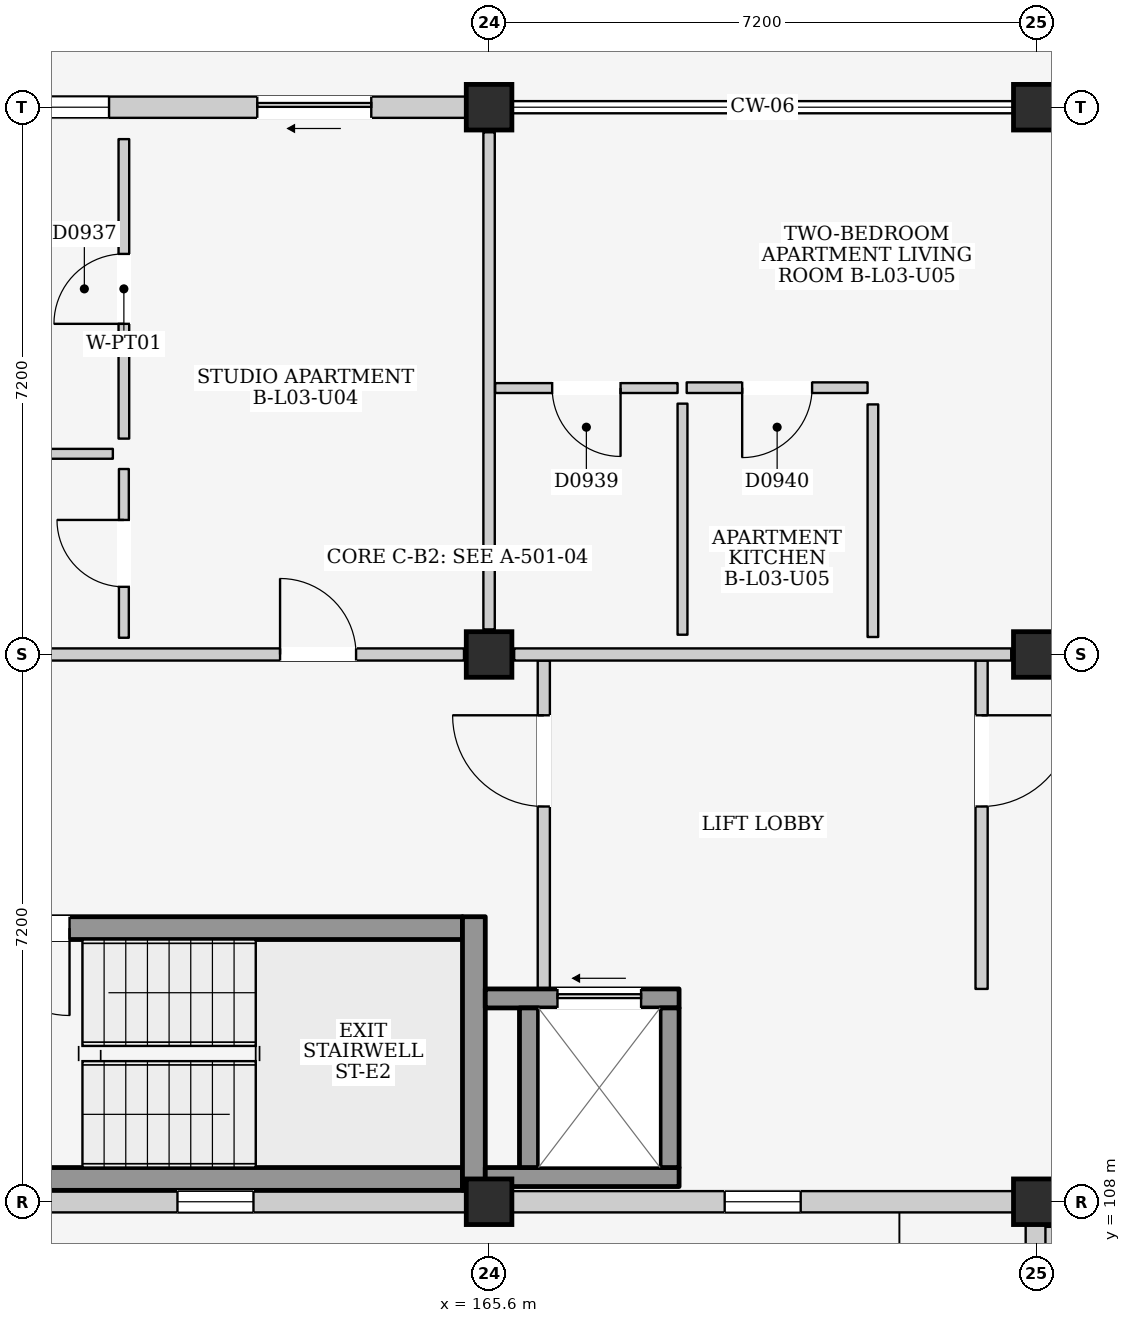
"""IFC4 building model, lengths in metres.
Left out: names, types, materials, properties, quantities, classifications, styles, units other than length and angle.
Written with IfcOpenShell. Run it as: python <this file> out.ifc"""

import sys

from ifc_helpers import new_model, si_unit, direction, frame, frame_2d, origin, origin_2d, place, context, subcontext, project, spatial, rectangle, extrude, element, fill, save


model = new_model("IFC4")
c1 = context("Model", 3, precision=1e-05, world=origin(), true_north=direction((0.0, 1.0)))
c2 = subcontext(c1, "Body", "Model", "MODEL_VIEW")
j1 = project(units=[si_unit("LENGTHUNIT", "METRE"), si_unit("PLANEANGLEUNIT", "RADIAN")], contexts=[c1])
p1 = place(None, origin())
s1 = spatial("IfcSite", under=j1, at=p1, CompositionType="ELEMENT")
p2 = place(p1, origin())
s2 = spatial("IfcBuilding", under=s1, at=p2, CompositionType="ELEMENT")
p3 = place(p2, frame((0.0, 0.0, 12.2)))
s3 = spatial("IfcBuildingStorey", under=s2, at=p3, CompositionType="ELEMENT", Elevation=12.2)
for number, where, z_axis, x_axis in (
    (1, (165.6, 108.0, 0.0), (0.0, 0.0, 1.0), (1.0, 0.0, 0.0)),
    (2, (165.6, 115.2, 0.0), (0.0, 0.0, 1.0), (1.0, 0.0, 0.0)),
    (3, (165.6, 122.4, 0.0), (0.0, 0.0, 1.0), (1.0, 0.0, 0.0)),
    (4, (172.8, 108.0, 0.0), (0.0, 0.0, 1.0), (1.0, 0.0, 0.0)),
    (5, (172.8, 115.2, 0.0), (0.0, 0.0, 1.0), (1.0, 0.0, 0.0)),
    (6, (172.8, 122.4, 0.0), (0.0, 0.0, 1.0), (1.0, 0.0, 0.0)),
):
    element("IfcColumn", number, at=place(p3, frame(where, z_axis=z_axis, x_axis=x_axis)), inside=s3, PredefinedType="COLUMN", context=c2, shape_type="SweptSolid", body=[
        extrude(rectangle(XDim=0.6, YDim=0.6, at=origin_2d()), origin(), (0.0, 0.0, 1.0), 3.2),
    ])
p4 = place(p3, frame((158.7, 108.0, 0.0), z_axis=(0.0, 0.0, 1.0), x_axis=(1.0, 0.0, 0.0)))
e7 = element("IfcWall", 7, at=p4, inside=s3, PredefinedType="ELEMENTEDWALL", context=c2, shape_type="SweptSolid", body=[
    extrude(rectangle(XDim=6.6, YDim=0.28, at=frame_2d((3.3, 0.0))), origin(), (0.0, 0.0, 1.0), 2.365),
])
p5 = place(p4, frame((2.8, 0.0, 1.2)))
e8 = element("IfcOpeningElement", 8, at=p5, cuts=e7, PredefinedType="OPENING", context=c2, shape_type="SweptSolid", body=[
    extrude(rectangle(XDim=1.0, YDim=0.9, at=frame_2d((0.5, 0.45))), frame((0.0, 0.155, 0.0), z_axis=(0.0, -1.0, 0.0), x_axis=(1.0, 0.0, 0.0)), (0.0, 0.0, 1.0), 0.31),
])
p6 = place(p3, frame((158.7, 122.4, 0.0), z_axis=(0.0, 0.0, 1.0), x_axis=(1.0, 0.0, 0.0)))
e9 = element("IfcWall", 9, at=p6, inside=s3, PredefinedType="ELEMENTEDWALL", context=c2, shape_type="SweptSolid", body=[
    extrude(rectangle(XDim=6.6, YDim=0.28, at=frame_2d((3.3, 0.0))), origin(), (0.0, 0.0, 1.0), 2.445),
])
p7 = place(p6, frame((3.85, 0.0, 0.0)))
e10 = element("IfcOpeningElement", 10, at=p7, cuts=e9, PredefinedType="OPENING", context=c2, shape_type="SweptSolid", body=[
    extrude(rectangle(XDim=1.5, YDim=2.12, at=frame_2d((0.75, 1.06))), frame((0.0, 0.155, 0.0), z_axis=(0.0, -1.0, 0.0), x_axis=(1.0, 0.0, 0.0)), (0.0, 0.0, 1.0), 0.31),
])
p8 = place(p6, frame((0.55, 0.0, 0.835)))
e11 = element("IfcOpeningElement", 11, at=p8, cuts=e9, PredefinedType="OPENING", context=c2, shape_type="SweptSolid", body=[
    extrude(rectangle(XDim=1.35, YDim=1.5, at=frame_2d((0.675, 0.75))), frame((0.0, 0.155, 0.0), z_axis=(0.0, -1.0, 0.0), x_axis=(1.0, 0.0, 0.0)), (0.0, 0.0, 1.0), 0.31),
])
p9 = place(p3, frame((165.9, 108.0, 0.0), z_axis=(0.0, 0.0, 1.0), x_axis=(1.0, 0.0, 0.0)))
e12 = element("IfcWall", 12, at=p9, inside=s3, PredefinedType="ELEMENTEDWALL", context=c2, shape_type="SweptSolid", body=[
    extrude(rectangle(XDim=6.6, YDim=0.28, at=frame_2d((3.3, 0.0))), origin(), (0.0, 0.0, 1.0), 2.365),
])
p10 = place(p9, frame((2.8, 0.0, 1.2)))
e13 = element("IfcOpeningElement", 13, at=p10, cuts=e12, PredefinedType="OPENING", context=c2, shape_type="SweptSolid", body=[
    extrude(rectangle(XDim=1.0, YDim=0.9, at=frame_2d((0.5, 0.45))), frame((0.0, 0.155, 0.0), z_axis=(0.0, -1.0, 0.0), x_axis=(1.0, 0.0, 0.0)), (0.0, 0.0, 1.0), 0.31),
])
p11 = place(p3, frame((172.8, 101.1, 0.0), z_axis=(0.0, 0.0, 1.0), x_axis=(0.0, 1.0, 0.0)))
e14 = element("IfcWall", 14, at=p11, inside=s3, PredefinedType="ELEMENTEDWALL", context=c2, shape_type="SweptSolid", body=[
    extrude(rectangle(XDim=6.6, YDim=0.28, at=frame_2d((3.3, 0.0))), origin(), (0.0, 0.0, 1.0), 2.415),
])
p12 = place(p11, frame((2.5, 0.0, 0.0)))
e15 = element("IfcOpeningElement", 15, at=p12, cuts=e14, PredefinedType="OPENING", context=c2, shape_type="SweptSolid", body=[
    extrude(rectangle(XDim=1.4, YDim=2.1, at=frame_2d((0.7, 1.05))), frame((0.0, 0.155, 0.0), z_axis=(0.0, -1.0, 0.0), x_axis=(1.0, 0.0, 0.0)), (0.0, 0.0, 1.0), 0.31),
])
p13 = place(p3, frame((158.75, 108.3, 0.0), z_axis=(0.0, 0.0, 1.0), x_axis=(1.0, 0.0, 0.0)))
e16 = element("IfcWall", 16, at=p13, inside=s3, PredefinedType="SHEAR", context=c2, shape_type="SweptSolid", body=[
    extrude(rectangle(XDim=6.5, YDim=0.3, at=frame_2d((3.25, 0.0))), origin(), (0.0, 0.0, 1.0), 2.98),
])
p14 = place(p3, frame((158.75, 111.6, 0.0), z_axis=(0.0, 0.0, 1.0), x_axis=(1.0, 0.0, 0.0)))
e17 = element("IfcWall", 17, at=p14, inside=s3, PredefinedType="SHEAR", context=c2, shape_type="SweptSolid", body=[
    extrude(rectangle(XDim=6.5, YDim=0.3, at=frame_2d((3.25, 0.0))), origin(), (0.0, 0.0, 1.0), 2.98),
])
p15 = place(p14, frame((0.18, 0.0, 0.0)))
e18 = element("IfcOpeningElement", 18, at=p15, cuts=e17, PredefinedType="OPENING", context=c2, shape_type="SweptSolid", body=[
    extrude(rectangle(XDim=1.15, YDim=2.2, at=frame_2d((0.575, 1.1))), frame((0.0, 0.165, 0.0), z_axis=(0.0, -1.0, 0.0), x_axis=(1.0, 0.0, 0.0)), (0.0, 0.0, 1.0), 0.33),
])
p16 = place(p3, frame((165.4, 108.15, 0.0), z_axis=(0.0, 0.0, 1.0), x_axis=(0.0, 1.0, 0.0)))
e19 = element("IfcWall", 19, at=p16, inside=s3, PredefinedType="SHEAR", context=c2, shape_type="SweptSolid", body=[
    extrude(rectangle(XDim=3.6, YDim=0.3, at=frame_2d((1.8, 0.0))), origin(), (0.0, 0.0, 1.0), 2.98),
])
p17 = place(p3, frame((166.32, 110.8, 0.0), z_axis=(0.0, 0.0, 1.0), x_axis=(0.0, 1.0, 0.0)))
e20 = element("IfcWall", 20, at=p17, inside=s3, PredefinedType="PARTITIONING", context=c2, shape_type="SweptSolid", body=[
    extrude(rectangle(XDim=4.32, YDim=0.16, at=frame_2d((2.16, 0.0))), origin(), (0.0, 0.0, 1.0), 2.98),
])
p18 = place(p17, frame((2.4, 0.0, 0.0)))
e21 = element("IfcOpeningElement", 21, at=p18, cuts=e20, PredefinedType="OPENING", context=c2, shape_type="SweptSolid", body=[
    extrude(rectangle(XDim=1.2, YDim=2.2, at=frame_2d((0.6, 1.1))), frame((0.0, 0.095, 0.0), z_axis=(0.0, -1.0, 0.0), x_axis=(1.0, 0.0, 0.0)), (0.0, 0.0, 1.0), 0.19),
])
p19 = place(p3, frame((172.08, 110.8, 0.0), z_axis=(0.0, 0.0, 1.0), x_axis=(0.0, 1.0, 0.0)))
e22 = element("IfcWall", 22, at=p19, inside=s3, PredefinedType="PARTITIONING", context=c2, shape_type="SweptSolid", body=[
    extrude(rectangle(XDim=4.32, YDim=0.16, at=frame_2d((2.16, 0.0))), origin(), (0.0, 0.0, 1.0), 2.98),
])
p20 = place(p19, frame((2.4, 0.0, 0.0)))
e23 = element("IfcOpeningElement", 23, at=p20, cuts=e22, PredefinedType="OPENING", context=c2, shape_type="SweptSolid", body=[
    extrude(rectangle(XDim=1.2, YDim=2.2, at=frame_2d((0.6, 1.1))), frame((0.0, 0.095, 0.0), z_axis=(0.0, -1.0, 0.0), x_axis=(1.0, 0.0, 0.0)), (0.0, 0.0, 1.0), 0.19),
])
p21 = place(p3, frame((165.55, 108.325, 0.0), z_axis=(0.0, 0.0, 1.0), x_axis=(1.0, 0.0, 0.0)))
e24 = element("IfcWall", 24, at=p21, inside=s3, PredefinedType="SHEAR", context=c2, shape_type="SweptSolid", body=[
    extrude(rectangle(XDim=2.55, YDim=0.25, at=frame_2d((1.275, 0.0))), origin(), (0.0, 0.0, 1.0), 2.98),
])
p22 = place(p3, frame((165.55, 110.675, 0.0), z_axis=(0.0, 0.0, 1.0), x_axis=(1.0, 0.0, 0.0)))
e25 = element("IfcWall", 25, at=p22, inside=s3, PredefinedType="SHEAR", context=c2, shape_type="SweptSolid", body=[
    extrude(rectangle(XDim=2.55, YDim=0.25, at=frame_2d((1.275, 0.0))), origin(), (0.0, 0.0, 1.0), 2.98),
])
p23 = place(p22, frame((0.95, 0.0, 0.0)))
e26 = element("IfcOpeningElement", 26, at=p23, cuts=e25, PredefinedType="OPENING", context=c2, shape_type="SweptSolid", body=[
    extrude(rectangle(XDim=1.1, YDim=2.15, at=frame_2d((0.55, 1.075))), frame((0.0, 0.14, 0.0), z_axis=(0.0, -1.0, 0.0), x_axis=(1.0, 0.0, 0.0)), (0.0, 0.0, 1.0), 0.28),
])
for number, where, z_axis, x_axis in (
    (27, (166.125, 108.45, 0.0), (0.0, 0.0, 1.0), (0.0, 1.0, 0.0)),
    (28, (167.975, 108.45, 0.0), (0.0, 0.0, 1.0), (0.0, 1.0, 0.0)),
):
    element("IfcWall", number, at=place(p3, frame(where, z_axis=z_axis, x_axis=x_axis)), inside=s3, PredefinedType="SHEAR", context=c2, shape_type="SweptSolid", body=[
        extrude(rectangle(XDim=2.1, YDim=0.25, at=frame_2d((1.05, 0.0))), origin(), (0.0, 0.0, 1.0), 2.98),
    ])
p24 = place(p3, frame((158.73, 115.2, 0.0), z_axis=(0.0, 0.0, 1.0), x_axis=(1.0, 0.0, 0.0)))
e29 = element("IfcWall", 29, at=p24, inside=s3, PredefinedType="PARTITIONING", context=c2, shape_type="SweptSolid", body=[
    extrude(rectangle(XDim=6.54, YDim=0.16, at=frame_2d((3.27, 0.0))), origin(), (0.0, 0.0, 1.0), 2.365),
])
p25 = place(p24, frame((4.12, 0.0, 0.0)))
e30 = element("IfcOpeningElement", 30, at=p25, cuts=e29, PredefinedType="OPENING", context=c2, shape_type="SweptSolid", body=[
    extrude(rectangle(XDim=1.0, YDim=2.15, at=frame_2d((0.5, 1.075))), frame((0.0, 0.095, 0.0), z_axis=(0.0, -1.0, 0.0), x_axis=(1.0, 0.0, 0.0)), (0.0, 0.0, 1.0), 0.19),
])
p26 = place(p3, frame((165.6, 115.53, 0.0), z_axis=(0.0, 0.0, 1.0), x_axis=(0.0, 1.0, 0.0)))
e31 = element("IfcWall", 31, at=p26, inside=s3, PredefinedType="PARTITIONING", context=c2, shape_type="SweptSolid", body=[
    extrude(rectangle(XDim=6.54, YDim=0.15, at=frame_2d((3.27, 0.0))), origin(), (0.0, 0.0, 1.0), 2.415),
])
p27 = place(p3, frame((158.6, 117.84, 0.0), z_axis=(0.0, 0.0, 1.0), x_axis=(1.0, 0.0, 0.0)))
e32 = element("IfcWall", 32, at=p27, inside=s3, PredefinedType="PARTITIONING", context=c2, shape_type="SweptSolid", body=[
    extrude(rectangle(XDim=2.05, YDim=0.13, at=frame_2d((1.025, 0.0))), origin(), (0.0, 0.0, 1.0), 2.98),
])
p28 = place(p3, frame((160.795, 115.42, 0.0), z_axis=(0.0, 0.0, 1.0), x_axis=(0.0, 1.0, 0.0)))
e33 = element("IfcWall", 33, at=p28, inside=s3, PredefinedType="PARTITIONING", context=c2, shape_type="SweptSolid", body=[
    extrude(rectangle(XDim=2.22, YDim=0.13, at=frame_2d((1.11, 0.0))), origin(), (0.0, 0.0, 1.0), 2.98),
])
p29 = place(p28, frame((0.67, 0.0, 0.0)))
e34 = element("IfcOpeningElement", 34, at=p29, cuts=e33, PredefinedType="OPENING", context=c2, shape_type="SweptSolid", body=[
    extrude(rectangle(XDim=0.88, YDim=2.1, at=frame_2d((0.44, 1.05))), frame((0.0, 0.08, 0.0), z_axis=(0.0, -1.0, 0.0), x_axis=(1.0, 0.0, 0.0)), (0.0, 0.0, 1.0), 0.16),
])
p30 = place(p3, frame((160.795, 118.04, 0.0), z_axis=(0.0, 0.0, 1.0), x_axis=(0.0, 1.0, 0.0)))
e35 = element("IfcWall", 35, at=p30, inside=s3, PredefinedType="PARTITIONING", context=c2, shape_type="SweptSolid", body=[
    extrude(rectangle(XDim=3.94, YDim=0.14, at=frame_2d((1.97, 0.0))), origin(), (0.0, 0.0, 1.0), 2.98),
])
p31 = place(p30, frame((1.51, 0.0, 0.0)))
e36 = element("IfcOpeningElement", 36, at=p31, cuts=e35, PredefinedType="OPENING", context=c2, shape_type="SweptSolid", body=[
    extrude(rectangle(XDim=0.92, YDim=2.1, at=frame_2d((0.46, 1.05))), frame((0.0, 0.085, 0.0), z_axis=(0.0, -1.0, 0.0), x_axis=(1.0, 0.0, 0.0)), (0.0, 0.0, 1.0), 0.17),
])
p32 = place(p3, frame((165.93, 115.2, 0.0), z_axis=(0.0, 0.0, 1.0), x_axis=(1.0, 0.0, 0.0)))
e37 = element("IfcWall", 37, at=p32, inside=s3, PredefinedType="PARTITIONING", context=c2, shape_type="SweptSolid", body=[
    extrude(rectangle(XDim=6.54, YDim=0.16, at=frame_2d((3.27, 0.0))), origin(), (0.0, 0.0, 1.0), 2.365),
])
p33 = place(p3, frame((165.68, 118.705, 0.0), z_axis=(0.0, 0.0, 1.0), x_axis=(1.0, 0.0, 0.0)))
e38 = element("IfcWall", 38, at=p33, inside=s3, PredefinedType="PARTITIONING", context=c2, shape_type="SweptSolid", body=[
    extrude(rectangle(XDim=2.4, YDim=0.13, at=frame_2d((1.2, 0.0))), origin(), (0.0, 0.0, 1.0), 2.98),
])
p34 = place(p33, frame((0.75, 0.0, 0.0)))
e39 = element("IfcOpeningElement", 39, at=p34, cuts=e38, PredefinedType="OPENING", context=c2, shape_type="SweptSolid", body=[
    extrude(rectangle(XDim=0.9, YDim=2.1, at=frame_2d((0.45, 1.05))), frame((0.0, 0.08, 0.0), z_axis=(0.0, -1.0, 0.0), x_axis=(1.0, 0.0, 0.0)), (0.0, 0.0, 1.0), 0.16),
])
p35 = place(p3, frame((168.145, 115.46, 0.0), z_axis=(0.0, 0.0, 1.0), x_axis=(0.0, 1.0, 0.0)))
e40 = element("IfcWall", 40, at=p35, inside=s3, PredefinedType="PARTITIONING", context=c2, shape_type="SweptSolid", body=[
    extrude(rectangle(XDim=3.04, YDim=0.13, at=frame_2d((1.52, 0.0))), origin(), (0.0, 0.0, 1.0), 2.98),
])
p36 = place(p3, frame((168.2, 118.71, 0.0), z_axis=(0.0, 0.0, 1.0), x_axis=(1.0, 0.0, 0.0)))
e41 = element("IfcWall", 41, at=p36, inside=s3, PredefinedType="PARTITIONING", context=c2, shape_type="SweptSolid", body=[
    extrude(rectangle(XDim=2.38, YDim=0.14, at=frame_2d((1.19, 0.0))), origin(), (0.0, 0.0, 1.0), 2.98),
])
p37 = place(p36, frame((0.73, 0.0, 0.0)))
e42 = element("IfcOpeningElement", 42, at=p37, cuts=e41, PredefinedType="OPENING", context=c2, shape_type="SweptSolid", body=[
    extrude(rectangle(XDim=0.92, YDim=2.1, at=frame_2d((0.46, 1.05))), frame((0.0, 0.085, 0.0), z_axis=(0.0, -1.0, 0.0), x_axis=(1.0, 0.0, 0.0)), (0.0, 0.0, 1.0), 0.17),
])
p38 = place(p3, frame((170.65, 115.43, 0.0), z_axis=(0.0, 0.0, 1.0), x_axis=(0.0, 1.0, 0.0)))
e43 = element("IfcWall", 43, at=p38, inside=s3, PredefinedType="PARTITIONING", context=c2, shape_type="SweptSolid", body=[
    extrude(rectangle(XDim=3.06, YDim=0.14, at=frame_2d((1.53, 0.0))), origin(), (0.0, 0.0, 1.0), 2.98),
])
p39 = place(p3, frame((173.0, 101.13, 0.0), z_axis=(0.0, 0.0, 1.0), x_axis=(0.0, 1.0, 0.0)))
e44 = element("IfcWall", 44, at=p39, inside=s3, PredefinedType="PARTITIONING", context=c2, shape_type="SweptSolid", body=[
    extrude(rectangle(XDim=6.54, YDim=0.16, at=frame_2d((3.27, 0.0))), origin(), (0.0, 0.0, 1.0), 2.415),
])
p40 = place(p39, frame((2.76, 0.0, 0.0)))
e45 = element("IfcOpeningElement", 45, at=p40, cuts=e44, PredefinedType="OPENING", context=c2, shape_type="SweptSolid", body=[
    extrude(rectangle(XDim=1.02, YDim=2.18, at=frame_2d((0.51, 1.09))), frame((0.0, 0.095, 0.0), z_axis=(0.0, -1.0, 0.0), x_axis=(1.0, 0.0, 0.0)), (0.0, 0.0, 1.0), 0.19),
])
p41 = place(p5, origin())
e46 = element("IfcWindow", 46, at=p41, inside=s3, PartitioningType="SINGLE_PANEL", PredefinedType="WINDOW", context=c2, shape_type="SweptSolid", body=[
    extrude(rectangle(XDim=1.0, YDim=0.9, at=frame_2d((0.5, 0.45))), frame((0.0, 0.03, 0.0), z_axis=(0.0, -1.0, 0.0), x_axis=(1.0, 0.0, 0.0)), (0.0, 0.0, 1.0), 0.06),
])
fill(e8, e46)
p42 = place(p7, frame((1.5, 0.0, 0.0), z_axis=(0.0, 0.0, 1.0), x_axis=(-1.0, 0.0, 0.0)))
e47 = element("IfcDoor", 47, at=p42, inside=s3, OperationType="SLIDING_TO_LEFT", PredefinedType="DOOR", context=c2, shape_type="SweptSolid", body=[
    extrude(rectangle(XDim=1.5, YDim=2.12, at=frame_2d((0.75, 1.06))), frame((0.0, 0.025, 0.0), z_axis=(0.0, -1.0, 0.0), x_axis=(1.0, 0.0, 0.0)), (0.0, 0.0, 1.0), 0.05),
])
fill(e10, e47)
p43 = place(p8, origin())
e48 = element("IfcWindow", 48, at=p43, inside=s3, PartitioningType="SINGLE_PANEL", PredefinedType="WINDOW", context=c2, shape_type="SweptSolid", body=[
    extrude(rectangle(XDim=1.35, YDim=1.5, at=frame_2d((0.675, 0.75))), frame((0.0, 0.03, 0.0), z_axis=(0.0, -1.0, 0.0), x_axis=(1.0, 0.0, 0.0)), (0.0, 0.0, 1.0), 0.06),
])
fill(e11, e48)
p44 = place(p10, origin())
e49 = element("IfcWindow", 49, at=p44, inside=s3, PartitioningType="SINGLE_PANEL", PredefinedType="WINDOW", context=c2, shape_type="SweptSolid", body=[
    extrude(rectangle(XDim=1.0, YDim=0.9, at=frame_2d((0.5, 0.45))), frame((0.0, 0.03, 0.0), z_axis=(0.0, -1.0, 0.0), x_axis=(1.0, 0.0, 0.0)), (0.0, 0.0, 1.0), 0.06),
])
fill(e13, e49)
p45 = place(p15, frame((1.15, 0.0, 0.0), z_axis=(0.0, 0.0, 1.0), x_axis=(-1.0, 0.0, 0.0)))
e50 = element("IfcDoor", 50, at=p45, inside=s3, OperationType="SINGLE_SWING_LEFT", PredefinedType="DOOR", context=c2, shape_type="SweptSolid", body=[
    extrude(rectangle(XDim=1.15, YDim=2.2, at=frame_2d((0.575, 1.1))), frame((0.0, 0.025, 0.0), z_axis=(0.0, -1.0, 0.0), x_axis=(1.0, 0.0, 0.0)), (0.0, 0.0, 1.0), 0.05),
])
fill(e18, e50)
p46 = place(p18, origin())
e51 = element("IfcDoor", 51, at=p46, inside=s3, OperationType="SINGLE_SWING_RIGHT", PredefinedType="DOOR", context=c2, shape_type="SweptSolid", body=[
    extrude(rectangle(XDim=1.2, YDim=2.2, at=frame_2d((0.6, 1.1))), frame((0.0, 0.025, 0.0), z_axis=(0.0, -1.0, 0.0), x_axis=(1.0, 0.0, 0.0)), (0.0, 0.0, 1.0), 0.05),
])
fill(e21, e51)
p47 = place(p20, frame((1.2, 0.0, 0.0), z_axis=(0.0, 0.0, 1.0), x_axis=(-1.0, 0.0, 0.0)))
e52 = element("IfcDoor", 52, at=p47, inside=s3, OperationType="SINGLE_SWING_LEFT", PredefinedType="DOOR", context=c2, shape_type="SweptSolid", body=[
    extrude(rectangle(XDim=1.2, YDim=2.2, at=frame_2d((0.6, 1.1))), frame((0.0, 0.025, 0.0), z_axis=(0.0, -1.0, 0.0), x_axis=(1.0, 0.0, 0.0)), (0.0, 0.0, 1.0), 0.05),
])
fill(e23, e52)
p48 = place(p23, origin())
e53 = element("IfcDoor", 53, at=p48, inside=s3, OperationType="SLIDING_TO_LEFT", PredefinedType="DOOR", context=c2, shape_type="SweptSolid", body=[
    extrude(rectangle(XDim=1.1, YDim=2.15, at=frame_2d((0.55, 1.075))), frame((0.0, 0.025, 0.0), z_axis=(0.0, -1.0, 0.0), x_axis=(1.0, 0.0, 0.0)), (0.0, 0.0, 1.0), 0.05),
])
fill(e26, e53)
p49 = place(p25, origin())
e54 = element("IfcDoor", 54, at=p49, inside=s3, OperationType="SINGLE_SWING_LEFT", PredefinedType="DOOR", context=c2, shape_type="SweptSolid", body=[
    extrude(rectangle(XDim=1.0, YDim=2.15, at=frame_2d((0.5, 1.075))), frame((0.0, 0.025, 0.0), z_axis=(0.0, -1.0, 0.0), x_axis=(1.0, 0.0, 0.0)), (0.0, 0.0, 1.0), 0.05),
])
fill(e30, e54)
p50 = place(p29, origin())
e55 = element("IfcDoor", 55, at=p50, inside=s3, OperationType="SINGLE_SWING_RIGHT", PredefinedType="DOOR", context=c2, shape_type="SweptSolid", body=[
    extrude(rectangle(XDim=0.88, YDim=2.1, at=frame_2d((0.44, 1.05))), frame((0.0, 0.025, 0.0), z_axis=(0.0, -1.0, 0.0), x_axis=(1.0, 0.0, 0.0)), (0.0, 0.0, 1.0), 0.05),
])
fill(e34, e55)
p51 = place(p31, origin())
e56 = element("IfcDoor", 56, at=p51, inside=s3, OperationType="SINGLE_SWING_LEFT", PredefinedType="DOOR", context=c2, shape_type="SweptSolid", body=[
    extrude(rectangle(XDim=0.92, YDim=2.1, at=frame_2d((0.46, 1.05))), frame((0.0, 0.025, 0.0), z_axis=(0.0, -1.0, 0.0), x_axis=(1.0, 0.0, 0.0)), (0.0, 0.0, 1.0), 0.05),
])
fill(e36, e56)
p52 = place(p34, frame((0.9, 0.0, 0.0), z_axis=(0.0, 0.0, 1.0), x_axis=(-1.0, 0.0, 0.0)))
e57 = element("IfcDoor", 57, at=p52, inside=s3, OperationType="SINGLE_SWING_LEFT", PredefinedType="DOOR", context=c2, shape_type="SweptSolid", body=[
    extrude(rectangle(XDim=0.9, YDim=2.1, at=frame_2d((0.45, 1.05))), frame((0.0, 0.025, 0.0), z_axis=(0.0, -1.0, 0.0), x_axis=(1.0, 0.0, 0.0)), (0.0, 0.0, 1.0), 0.05),
])
fill(e39, e57)
p53 = place(p37, frame((0.92, 0.0, 0.0), z_axis=(0.0, 0.0, 1.0), x_axis=(-1.0, 0.0, 0.0)))
e58 = element("IfcDoor", 58, at=p53, inside=s3, OperationType="SINGLE_SWING_RIGHT", PredefinedType="DOOR", context=c2, shape_type="SweptSolid", body=[
    extrude(rectangle(XDim=0.92, YDim=2.1, at=frame_2d((0.46, 1.05))), frame((0.0, 0.025, 0.0), z_axis=(0.0, -1.0, 0.0), x_axis=(1.0, 0.0, 0.0)), (0.0, 0.0, 1.0), 0.05),
])
fill(e42, e58)
save(model, sys.argv[1])
